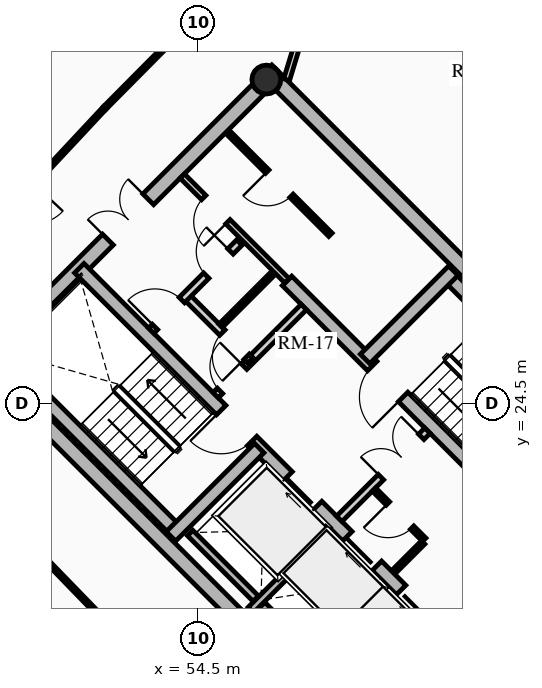
"""IFC4 building model, lengths in metres.
Left out: names, types, materials, properties, quantities, classifications, styles, units other than length and angle.
Written with IfcOpenShell. Run it as: python <this file> out.ifc"""

import sys

from ifc_helpers import new_model, si_unit, direction, frame, frame_2d, origin, origin_2d, place, context, subcontext, project, spatial, rectangle, hollow_circle, extrude, source, transform, mapped, element, fill, save


model = new_model("IFC4")
c1 = context("Model", 3, precision=1e-05, world=origin(), true_north=direction((0.0, 1.0)))
c2 = subcontext(c1, "Body", "Model", "MODEL_VIEW")
j1 = project(units=[si_unit("LENGTHUNIT", "METRE"), si_unit("PLANEANGLEUNIT", "RADIAN")], contexts=[c1])
p1 = place(None, origin())
s1 = spatial("IfcSite", under=j1, at=p1, CompositionType="ELEMENT")
p2 = place(p1, origin())
s2 = spatial("IfcBuilding", under=s1, at=p2, CompositionType="ELEMENT")
p3 = place(p2, frame((0.0, 0.0, 189.43)))
s3 = spatial("IfcBuildingStorey", under=s2, at=p3, CompositionType="ELEMENT", Elevation=189.43)
for number, where, z_axis, x_axis in (
    (1, (58.702, 15.732, 0.0), (0.0, 0.0, 1.0), (-0.707, 0.707, 0.0)),
    (2, (66.268, 23.298, 0.0), (0.0, 0.0, 1.0), (-0.707, 0.707, 0.0)),
):
    element("IfcWall", number, at=place(p3, frame(where, z_axis=z_axis, x_axis=x_axis)), inside=s3, PredefinedType="SHEAR", context=c2, shape_type="SweptSolid", body=[
        extrude(rectangle(XDim=14.1, YDim=0.4, at=frame_2d((7.05, 0.0))), origin(), (0.0, 0.0, 1.0), 2.91),
    ])
p4 = place(p3, frame((58.561, 15.873, 0.0), z_axis=(0.0, 0.0, 1.0), x_axis=(0.707106781187, 0.707106781187, 0.0)))
e3 = element("IfcWall", 3, at=p4, inside=s3, PredefinedType="SHEAR", context=c2, shape_type="SweptSolid", body=[
    extrude(rectangle(XDim=10.7, YDim=0.4, at=frame_2d((5.35, 0.0))), origin(), (0.0, 0.0, 1.0), 2.91),
])
m1 = source(origin(), c2, "Body", "SweptSolid", [
    extrude(rectangle(XDim=1.5, YDim=2.02, at=frame_2d((0.75, 1.01))), frame((0.0, 0.21, 0.0), z_axis=(0.0, -1.0, 0.0), x_axis=(1.0, 0.0, 0.0)), (0.0, 0.0, 1.0), 0.42),
])
p5 = place(p4, frame((5.45, 0.0, 0.0)))
e4 = element("IfcOpeningElement", 4, at=p5, cuts=e3, PredefinedType="OPENING", context=c2, shape_type="MappedRepresentation", body=[
    mapped(m1, transform((0.0, 0.0, 0.0), x_axis=(1.0, 0.0, 0.0), y_axis=(0.0, 1.0, 0.0), z_axis=(0.0, 0.0, 1.0), scale=1.0)),
])
p6 = place(p3, frame((48.873, 25.561, 0.0), z_axis=(0.0, 0.0, 1.0), x_axis=(0.707106781187, 0.707106781187, 0.0)))
e5 = element("IfcWall", 5, at=p6, inside=s3, PredefinedType="SHEAR", context=c2, shape_type="SweptSolid", body=[
    extrude(rectangle(XDim=10.7, YDim=0.4, at=frame_2d((5.35, 0.0))), origin(), (0.0, 0.0, 1.0), 2.91),
])
p7 = place(p6, frame((4.6, 0.0, 0.0)))
e6 = element("IfcOpeningElement", 6, at=p7, cuts=e5, PredefinedType="OPENING", context=c2, shape_type="MappedRepresentation", body=[
    mapped(m1, transform((0.0, 0.0, 0.0), x_axis=(1.0, 0.0, 0.0), y_axis=(0.0, 1.0, 0.0), z_axis=(0.0, 0.0, 1.0), scale=1.0)),
])
p8 = place(p3, frame((61.06, 18.373, 0.0), z_axis=(0.0, 0.0, 1.0), x_axis=(-0.707106781187, 0.707106781187, 0.0)))
e7 = element("IfcWall", 7, at=p8, inside=s3, PredefinedType="SHEAR", context=c2, shape_type="SweptSolid", body=[
    extrude(rectangle(XDim=13.7, YDim=0.35, at=frame_2d((6.85, 0.0))), origin(), (0.0, 0.0, 1.0), 2.91),
])
m2 = source(origin(), c2, "Body", "SweptSolid", [
    extrude(rectangle(XDim=1.1, YDim=2.015, at=frame_2d((0.55, 1.007))), frame((0.0, 0.185, 0.0), z_axis=(0.0, -1.0, 0.0), x_axis=(1.0, 0.0, 0.0)), (0.0, 0.0, 1.0), 0.37),
])
p9 = place(p8, frame((4.85, 0.0, 0.0)))
e8 = element("IfcOpeningElement", 8, at=p9, cuts=e7, PredefinedType="OPENING", context=c2, shape_type="MappedRepresentation", body=[
    mapped(m2, transform((0.0, 0.0, 0.0), x_axis=(1.0, 0.0, 0.0), y_axis=(0.0, 1.0, 0.0), z_axis=(0.0, 0.0, 1.0), scale=1.0)),
])
p10 = place(p8, frame((0.625, 0.0, 0.0)))
e9 = element("IfcOpeningElement", 9, at=p10, cuts=e7, PredefinedType="OPENING", context=c2, shape_type="MappedRepresentation", body=[
    mapped(m2, transform((0.0, 0.0, 0.0), x_axis=(1.0, 0.0, 0.0), y_axis=(0.0, 1.0, 0.0), z_axis=(0.0, 0.0, 1.0), scale=1.0)),
])
p11 = place(p8, frame((2.625, 0.0, 0.0)))
e10 = element("IfcOpeningElement", 10, at=p11, cuts=e7, PredefinedType="OPENING", context=c2, shape_type="MappedRepresentation", body=[
    mapped(m2, transform((0.0, 0.0, 0.0), x_axis=(1.0, 0.0, 0.0), y_axis=(0.0, 1.0, 0.0), z_axis=(0.0, 0.0, 1.0), scale=1.0)),
])
m3 = source(origin(), c2, "Body", "SweptSolid", [
    extrude(rectangle(XDim=1.15, YDim=2.02, at=frame_2d((0.575, 1.01))), frame((0.0, 0.185, 0.0), z_axis=(0.0, -1.0, 0.0), x_axis=(1.0, 0.0, 0.0)), (0.0, 0.0, 1.0), 0.37),
])
p12 = place(p8, frame((7.27, 0.0, 0.0)))
e11 = element("IfcOpeningElement", 11, at=p12, cuts=e7, PredefinedType="OPENING", context=c2, shape_type="MappedRepresentation", body=[
    mapped(m3, transform((0.0, 0.0, 0.0), x_axis=(1.0, 0.0, 0.0), y_axis=(0.0, 1.0, 0.0), z_axis=(0.0, 0.0, 1.0), scale=1.0)),
])
p13 = place(p3, frame((63.627, 20.94, 0.0), z_axis=(0.0, 0.0, 1.0), x_axis=(-0.707119496762, 0.707094065383, 0.0)))
e12 = element("IfcWall", 12, at=p13, inside=s3, PredefinedType="SHEAR", context=c2, shape_type="SweptSolid", body=[
    extrude(rectangle(XDim=9.6, YDim=0.35, at=frame_2d((4.8, 0.0))), origin(), (0.0, 0.0, 1.0), 2.91),
])
p14 = place(p13, frame((5.28, 0.0, 0.0)))
e13 = element("IfcOpeningElement", 13, at=p14, cuts=e12, PredefinedType="OPENING", context=c2, shape_type="MappedRepresentation", body=[
    mapped(m3, transform((0.0, 0.0, 0.0), x_axis=(1.0, 0.0, 0.0), y_axis=(0.0, 1.0, 0.0), z_axis=(0.0, 0.0, 1.0), scale=1.0)),
])
p15 = place(p3, frame((53.922, 21.141, 0.0), z_axis=(0.0, 0.0, 1.0), x_axis=(-0.707106781187, 0.707106781187, 0.0)))
e14 = element("IfcWall", 14, at=p15, inside=s3, PredefinedType="SHEAR", context=c2, shape_type="SweptSolid", body=[
    extrude(rectangle(XDim=6.695, YDim=0.35, at=frame_2d((3.348, 0.0))), origin(), (0.0, 0.0, 1.0), 2.91),
])
p16 = place(p3, frame((53.784, 21.003, 0.0), z_axis=(0.0, 0.0, 1.0), x_axis=(0.707106781187, 0.707106781187, 0.0)))
e15 = element("IfcWall", 15, at=p16, inside=s3, PredefinedType="SHEAR", context=c2, shape_type="SweptSolid", body=[
    extrude(rectangle(XDim=3.285, YDim=0.35, at=frame_2d((1.643, 0.0))), origin(), (0.0, 0.0, 1.0), 2.91),
])
p17 = place(p3, frame((65.812, 23.125, 0.0), z_axis=(0.0, 0.0, 1.0), x_axis=(-0.707106781187, 0.707106781187, 0.0)))
e16 = element("IfcWall", 16, at=p17, inside=s3, PredefinedType="SHEAR", context=c2, shape_type="SweptSolid", body=[
    extrude(rectangle(XDim=6.695, YDim=0.35, at=frame_2d((3.348, 0.0))), origin(), (0.0, 0.0, 1.0), 2.91),
])
p18 = place(p3, frame((58.893, 25.674, 0.0), z_axis=(0.0, 0.0, 1.0), x_axis=(0.707106781187, 0.707106781187, 0.0)))
e17 = element("IfcWall", 17, at=p18, inside=s3, PredefinedType="SHEAR", context=c2, shape_type="SweptSolid", body=[
    extrude(rectangle(XDim=3.285, YDim=0.35, at=frame_2d((1.643, 0.0))), origin(), (0.0, 0.0, 1.0), 2.91),
])
p19 = place(p3, frame((56.294, 33.024, 0.0), z_axis=(0.0, 0.0, 1.0), x_axis=(0.707106781187, 0.707106781187, 0.0)))
e18 = element("IfcColumn", 18, at=p19, inside=s3, PredefinedType="COLUMN", context=c2, shape_type="SweptSolid", body=[
    extrude(hollow_circle(Radius=0.38, WallThickness=0.032, at=origin_2d()), origin(), (0.0, 0.0, 1.0), 2.91),
])
p20 = place(p3, frame((55.888, 19.069, 0.0), z_axis=(0.0, 0.0, 1.0), x_axis=(0.707106781187, 0.707106781187, 0.0)))
e19 = element("IfcWall", 19, at=p20, inside=s3, PredefinedType="SHEAR", context=c2, shape_type="SweptSolid", body=[
    extrude(rectangle(XDim=2.97, YDim=0.2, at=frame_2d((1.485, 0.0))), origin(), (0.0, 0.0, 1.0), 2.91),
])
p21 = place(p3, frame((56.015, 19.366, 0.0), z_axis=(0.0, 0.0, 1.0), x_axis=(-0.707106781187, 0.707106781187, 0.0)))
e20 = element("IfcWall", 20, at=p21, inside=s3, PredefinedType="SHEAR", context=c2, shape_type="SweptSolid", body=[
    extrude(rectangle(XDim=2.44, YDim=0.2, at=frame_2d((1.22, 0.0))), origin(), (0.0, 0.0, 1.0), 2.91),
])
p22 = place(p3, frame((57.284, 17.673, 0.0), z_axis=(0.0, 0.0, 1.0), x_axis=(0.707147878904, 0.70706568108, 0.0)))
e21 = element("IfcWall", 21, at=p22, inside=s3, PredefinedType="SHEAR", context=c2, shape_type="SweptSolid", body=[
    extrude(rectangle(XDim=2.97, YDim=0.2, at=frame_2d((1.485, 0.0))), origin(), (0.0, 0.0, 1.0), 2.91),
])
p23 = place(p3, frame((57.412, 17.97, 0.0), z_axis=(0.0, 0.0, 1.0), x_axis=(-0.707106781187, 0.707106781187, 0.0)))
e22 = element("IfcWall", 22, at=p23, inside=s3, PredefinedType="SHEAR", context=c2, shape_type="SweptSolid", body=[
    extrude(rectangle(XDim=1.735, YDim=0.2, at=frame_2d((0.867, 0.0))), origin(), (0.0, 0.0, 1.0), 2.91),
])
p24 = place(p3, frame((58.214, 21.467, 0.0), z_axis=(0.0, 0.0, 1.0), x_axis=(0.707106781187, 0.707106781187, 0.0)))
e23 = element("IfcWall", 23, at=p24, inside=s3, PredefinedType="PARTITIONING", context=c2, shape_type="SweptSolid", body=[
    extrude(rectangle(XDim=3.28, YDim=0.2, at=frame_2d((1.64, 0.0))), origin(), (0.0, 0.0, 1.0), 2.555),
])
m4 = source(origin(), c2, "Body", "SweptSolid", [
    extrude(rectangle(XDim=1.5, YDim=2.02, at=frame_2d((0.75, 1.01))), frame((0.0, 0.11, 0.0), z_axis=(0.0, -1.0, 0.0), x_axis=(1.0, 0.0, 0.0)), (0.0, 0.0, 1.0), 0.22),
])
p25 = place(p24, frame((1.55, 0.0, 0.0)))
e24 = element("IfcOpeningElement", 24, at=p25, cuts=e23, PredefinedType="OPENING", context=c2, shape_type="MappedRepresentation", body=[
    mapped(m4, transform((0.0, 0.0, 0.0), x_axis=(1.0, 0.0, 0.0), y_axis=(0.0, 1.0, 0.0), z_axis=(0.0, 0.0, 1.0), scale=1.0)),
])
p26 = place(p3, frame((54.961, 24.719, 0.0), z_axis=(0.0, 0.0, 1.0), x_axis=(0.707106781187, 0.707106781187, 0.0)))
e25 = element("IfcWall", 25, at=p26, inside=s3, PredefinedType="PARTITIONING", context=c2, shape_type="SweptSolid", body=[
    extrude(rectangle(XDim=3.28, YDim=0.2, at=frame_2d((1.64, 0.0))), origin(), (0.0, 0.0, 1.0), 2.555),
])
m5 = source(origin(), c2, "Body", "SweptSolid", [
    extrude(rectangle(XDim=0.9, YDim=2.005, at=frame_2d((0.45, 1.002))), frame((0.0, 0.11, 0.0), z_axis=(0.0, -1.0, 0.0), x_axis=(1.0, 0.0, 0.0)), (0.0, 0.0, 1.0), 0.22),
])
p27 = place(p26, frame((0.16, 0.0, 0.0)))
e26 = element("IfcOpeningElement", 26, at=p27, cuts=e25, PredefinedType="OPENING", context=c2, shape_type="MappedRepresentation", body=[
    mapped(m5, transform((0.0, 0.0, 0.0), x_axis=(1.0, 0.0, 0.0), y_axis=(0.0, 1.0, 0.0), z_axis=(0.0, 0.0, 1.0), scale=1.0)),
])
p28 = place(p3, frame((55.874, 25.631, 0.0), z_axis=(0.0, 0.0, 1.0), x_axis=(-0.707157639372, 0.707055919343, 0.0)))
e27 = element("IfcWall", 27, at=p28, inside=s3, PredefinedType="PARTITIONING", context=c2, shape_type="SweptSolid", body=[
    extrude(rectangle(XDim=2.4, YDim=0.2, at=frame_2d((1.2, 0.0))), origin(), (0.0, 0.0, 1.0), 2.555),
])
p29 = place(p28, frame((0.14, 0.0, 0.0)))
e28 = element("IfcOpeningElement", 28, at=p29, cuts=e27, PredefinedType="OPENING", context=c2, shape_type="MappedRepresentation", body=[
    mapped(m5, transform((0.0, 0.0, 0.0), x_axis=(1.0, 0.0, 0.0), y_axis=(0.0, 1.0, 0.0), z_axis=(0.0, 0.0, 1.0), scale=1.0)),
])
p30 = place(p3, frame((53.264, 26.416, 0.0), z_axis=(0.0, 0.0, 1.0), x_axis=(0.707106781187, 0.707106781187, 0.0)))
e29 = element("IfcWall", 29, at=p30, inside=s3, PredefinedType="PARTITIONING", context=c2, shape_type="SweptSolid", body=[
    extrude(rectangle(XDim=3.28, YDim=0.2, at=frame_2d((1.64, 0.0))), origin(), (0.0, 0.0, 1.0), 2.555),
])
m6 = source(origin(), c2, "Body", "SweptSolid", [
    extrude(rectangle(XDim=1.0, YDim=2.015, at=frame_2d((0.5, 1.007))), frame((0.0, 0.11, 0.0), z_axis=(0.0, -1.0, 0.0), x_axis=(1.0, 0.0, 0.0)), (0.0, 0.0, 1.0), 0.22),
])
p31 = place(p30, frame((0.14, 0.0, 0.0)))
e30 = element("IfcOpeningElement", 30, at=p31, cuts=e29, PredefinedType="OPENING", context=c2, shape_type="MappedRepresentation", body=[
    mapped(m6, transform((0.0, 0.0, 0.0), x_axis=(1.0, 0.0, 0.0), y_axis=(0.0, 1.0, 0.0), z_axis=(0.0, 0.0, 1.0), scale=1.0)),
])
p32 = place(p30, frame((2.05, 0.0, 0.0)))
e31 = element("IfcOpeningElement", 31, at=p32, cuts=e29, PredefinedType="OPENING", context=c2, shape_type="MappedRepresentation", body=[
    mapped(m5, transform((0.0, 0.0, 0.0), x_axis=(1.0, 0.0, 0.0), y_axis=(0.0, 1.0, 0.0), z_axis=(0.0, 0.0, 1.0), scale=1.0)),
])
p33 = place(p3, frame((60.448, 20.915, 0.0), z_axis=(0.0, 0.0, 1.0), x_axis=(-0.707106781187, 0.707106781187, 0.0)))
e32 = element("IfcWall", 32, at=p33, inside=s3, PredefinedType="PARTITIONING", context=c2, shape_type="SweptSolid", body=[
    extrude(rectangle(XDim=1.87, YDim=0.125, at=frame_2d((0.935, 0.0))), origin(), (0.0, 0.0, 1.0), 2.555),
])
m7 = source(origin(), c2, "Body", "SweptSolid", [
    extrude(rectangle(XDim=0.9, YDim=2.005, at=frame_2d((0.45, 1.002))), frame((0.0, 0.073, 0.0), z_axis=(0.0, -1.0, 0.0), x_axis=(1.0, 0.0, 0.0)), (0.0, 0.0, 1.0), 0.145),
])
p34 = place(p33, frame((0.45, 0.0, 0.0)))
e33 = element("IfcOpeningElement", 33, at=p34, cuts=e32, PredefinedType="OPENING", context=c2, shape_type="MappedRepresentation", body=[
    mapped(m7, transform((0.0, 0.0, 0.0), x_axis=(1.0, 0.0, 0.0), y_axis=(0.0, 1.0, 0.0), z_axis=(0.0, 0.0, 1.0), scale=1.0)),
])
p35 = place(p3, frame((59.643, 20.066, 0.0), z_axis=(0.0, 0.0, 1.0), x_axis=(0.707106781187, 0.707106781187, 0.0)))
e34 = element("IfcWall", 34, at=p35, inside=s3, PredefinedType="PARTITIONING", context=c2, shape_type="SweptSolid", body=[
    extrude(rectangle(XDim=1.1, YDim=0.125, at=frame_2d((0.55, 0.0))), origin(), (0.0, 0.0, 1.0), 2.555),
])
p36 = place(p3, frame((55.089, 26.543, 0.0), z_axis=(0.0, 0.0, 1.0), x_axis=(0.707106781187, 0.707106781187, 0.0)))
e35 = element("IfcWall", 35, at=p36, inside=s3, PredefinedType="PARTITIONING", context=c2, shape_type="SweptSolid", body=[
    extrude(rectangle(XDim=1.88, YDim=0.125, at=frame_2d((0.94, 0.0))), origin(), (0.0, 0.0, 1.0), 2.555),
])
p37 = place(p3, frame((56.839, 27.728, 0.0), z_axis=(0.0, 0.0, 1.0), x_axis=(-0.707106781187, 0.707106781187, 0.0)))
e36 = element("IfcWall", 36, at=p37, inside=s3, PredefinedType="PARTITIONING", context=c2, shape_type="SweptSolid", body=[
    extrude(rectangle(XDim=3.9, YDim=0.16, at=frame_2d((1.95, 0.0))), origin(), (0.0, 0.0, 1.0), 2.555),
])
m8 = source(origin(), c2, "Body", "SweptSolid", [
    extrude(rectangle(XDim=0.9, YDim=2.005, at=frame_2d((0.45, 1.002))), frame((0.0, 0.09, 0.0), z_axis=(0.0, -1.0, 0.0), x_axis=(1.0, 0.0, 0.0)), (0.0, 0.0, 1.0), 0.18),
])
p38 = place(p37, frame((2.2, 0.0, 0.0)))
e37 = element("IfcOpeningElement", 37, at=p38, cuts=e36, PredefinedType="OPENING", context=c2, shape_type="MappedRepresentation", body=[
    mapped(m8, transform((0.0, 0.0, 0.0), x_axis=(1.0, 0.0, 0.0), y_axis=(0.0, 1.0, 0.0), z_axis=(0.0, 0.0, 1.0), scale=1.0)),
])
p39 = place(p3, frame((57.981, 28.941, 0.0), z_axis=(0.0, 0.0, 1.0), x_axis=(-0.707074823725, 0.707138737204, 0.0)))
e38 = element("IfcWall", 38, at=p39, inside=s3, PredefinedType="PARTITIONING", context=c2, shape_type="SweptSolid", body=[
    extrude(rectangle(XDim=3.82, YDim=0.125, at=frame_2d((1.91, 0.0))), origin(), (0.0, 0.0, 1.0), 2.555),
])
p40 = place(p39, frame((1.45, 0.0, 0.0)))
e39 = element("IfcOpeningElement", 39, at=p40, cuts=e38, PredefinedType="OPENING", context=c2, shape_type="MappedRepresentation", body=[
    mapped(m7, transform((0.0, 0.0, 0.0), x_axis=(1.0, 0.0, 0.0), y_axis=(0.0, 1.0, 0.0), z_axis=(0.0, 0.0, 1.0), scale=1.0)),
])
p41 = place(p3, frame((54.427, 34.683, 0.0), z_axis=(0.0, 0.0, 1.0), x_axis=(-0.704178989986, -0.710022499687, 0.0)))
e40 = element("IfcWall", 40, at=p41, inside=s3, PredefinedType="MOVABLE", context=c2, shape_type="SweptSolid", body=[
    extrude(rectangle(XDim=3.384, YDim=0.1, at=frame_2d((1.692, 0.0))), origin(), (0.0, 0.0, 1.0), 2.125),
])
p42 = place(p3, frame((52.043, 32.28, 0.0), z_axis=(0.0, 0.0, 1.0), x_axis=(-0.682606081633, -0.730786519661, 0.0)))
e41 = element("IfcWall", 41, at=p42, inside=s3, PredefinedType="MOVABLE", context=c2, shape_type="SweptSolid", body=[
    extrude(rectangle(XDim=6.527, YDim=0.1, at=frame_2d((3.263, 0.0))), origin(), (0.0, 0.0, 1.0), 2.125),
])
m9 = source(origin(), c2, "Body", "SweptSolid", [
    extrude(rectangle(XDim=1.05, YDim=2.015, at=frame_2d((0.525, 1.007))), frame((0.0, 0.06, 0.0), z_axis=(0.0, -1.0, 0.0), x_axis=(1.0, 0.0, 0.0)), (0.0, 0.0, 1.0), 0.12),
])
p43 = place(p42, frame((2.738, 0.0, 0.0)))
e42 = element("IfcOpeningElement", 42, at=p43, cuts=e41, PredefinedType="OPENING", context=c2, shape_type="MappedRepresentation", body=[
    mapped(m9, transform((0.0, 0.0, 0.0), x_axis=(1.0, 0.0, 0.0), y_axis=(0.0, 1.0, 0.0), z_axis=(0.0, 0.0, 1.0), scale=1.0)),
])
p44 = place(p3, frame((47.706, 23.253, 0.0), z_axis=(0.0, 0.0, 1.0), x_axis=(0.696179266346, -0.717867974707, 0.0)))
e43 = element("IfcWall", 43, at=p44, inside=s3, PredefinedType="MOVABLE", context=c2, shape_type="SweptSolid", body=[
    extrude(rectangle(XDim=6.045, YDim=0.1, at=frame_2d((3.022, 0.0))), origin(), (0.0, 0.0, 1.0), 2.555),
])
p45 = place(p3, frame((56.828, 33.021, 0.0), z_axis=(0.0, 0.0, 1.0), x_axis=(0.292139093972, 0.956375841274, 0.0)))
e44 = element("IfcWall", 44, at=p45, inside=s3, PredefinedType="PARTITIONING", context=c2, shape_type="SweptSolid", body=[
    extrude(rectangle(XDim=2.186, YDim=0.16, at=frame_2d((1.093, 0.0))), origin(), (0.0, 0.0, 1.0), 2.125),
])
m10 = source(origin(), c2, "Body", "SweptSolid", [
    extrude(rectangle(XDim=1.05, YDim=2.015, at=frame_2d((0.525, 1.007))), frame((0.0, 0.09, 0.0), z_axis=(0.0, -1.0, 0.0), x_axis=(1.0, 0.0, 0.0)), (0.0, 0.0, 1.0), 0.18),
])
p46 = place(p45, frame((0.936, 0.0, 0.0)))
e45 = element("IfcOpeningElement", 45, at=p46, cuts=e44, PredefinedType="OPENING", context=c2, shape_type="MappedRepresentation", body=[
    mapped(m10, transform((0.0, 0.0, 0.0), x_axis=(1.0, 0.0, 0.0), y_axis=(0.0, 1.0, 0.0), z_axis=(0.0, 0.0, 1.0), scale=1.0)),
])
m11 = source(origin(), c2, "Body", "SweptSolid", [
    extrude(rectangle(XDim=1.1, YDim=2.015, at=frame_2d((0.55, 1.007))), frame((0.0, 0.025, 0.0), z_axis=(0.0, -1.0, 0.0), x_axis=(1.0, 0.0, 0.0)), (0.0, 0.0, 1.0), 0.05),
])
p47 = place(p9, origin())
e46 = element("IfcDoor", 46, at=p47, inside=s3, OperationType="SLIDING_TO_RIGHT", PredefinedType="DOOR", context=c2, shape_type="MappedRepresentation", body=[
    mapped(m11, transform((0.0, 0.0, 0.0), x_axis=(1.0, 0.0, 0.0), y_axis=(0.0, 1.0, 0.0), z_axis=(0.0, 0.0, 1.0), scale=1.0)),
])
fill(e8, e46)
p48 = place(p10, origin())
e47 = element("IfcDoor", 47, at=p48, inside=s3, OperationType="SLIDING_TO_LEFT", PredefinedType="DOOR", context=c2, shape_type="MappedRepresentation", body=[
    mapped(m11, transform((0.0, 0.0, 0.0), x_axis=(1.0, 0.0, 0.0), y_axis=(0.0, 1.0, 0.0), z_axis=(0.0, 0.0, 1.0), scale=1.0)),
])
fill(e9, e47)
p49 = place(p11, origin())
e48 = element("IfcDoor", 48, at=p49, inside=s3, OperationType="SLIDING_TO_RIGHT", PredefinedType="DOOR", context=c2, shape_type="MappedRepresentation", body=[
    mapped(m11, transform((0.0, 0.0, 0.0), x_axis=(1.0, 0.0, 0.0), y_axis=(0.0, 1.0, 0.0), z_axis=(0.0, 0.0, 1.0), scale=1.0)),
])
fill(e10, e48)
m12 = source(origin(), c2, "Body", "SweptSolid", [
    extrude(rectangle(XDim=1.15, YDim=2.02, at=frame_2d((0.575, 1.01))), frame((0.0, 0.025, 0.0), z_axis=(0.0, -1.0, 0.0), x_axis=(1.0, 0.0, 0.0)), (0.0, 0.0, 1.0), 0.05),
])
p50 = place(p12, origin())
e49 = element("IfcDoor", 49, at=p50, inside=s3, OperationType="SINGLE_SWING_RIGHT", PredefinedType="DOOR", context=c2, shape_type="MappedRepresentation", body=[
    mapped(m12, transform((0.0, 0.0, 0.0), x_axis=(1.0, 0.0, 0.0), y_axis=(0.0, 1.0, 0.0), z_axis=(0.0, 0.0, 1.0), scale=1.0)),
])
fill(e11, e49)
p51 = place(p14, origin())
e50 = element("IfcDoor", 50, at=p51, inside=s3, OperationType="SINGLE_SWING_LEFT", PredefinedType="DOOR", context=c2, shape_type="MappedRepresentation", body=[
    mapped(m12, transform((0.0, 0.0, 0.0), x_axis=(1.0, 0.0, 0.0), y_axis=(0.0, 1.0, 0.0), z_axis=(0.0, 0.0, 1.0), scale=1.0)),
])
fill(e13, e50)
m13 = source(origin(), c2, "Body", "SweptSolid", [
    extrude(rectangle(XDim=1.5, YDim=2.02, at=frame_2d((0.75, 1.01))), frame((0.0, 0.025, 0.0), z_axis=(0.0, -1.0, 0.0), x_axis=(1.0, 0.0, 0.0)), (0.0, 0.0, 1.0), 0.05),
])
p52 = place(p7, origin())
e51 = element("IfcDoor", 51, at=p52, inside=s3, OperationType="DOUBLE_DOOR_SINGLE_SWING", PredefinedType="DOOR", context=c2, shape_type="MappedRepresentation", body=[
    mapped(m13, transform((0.0, 0.0, 0.0), x_axis=(1.0, 0.0, 0.0), y_axis=(0.0, 1.0, 0.0), z_axis=(0.0, 0.0, 1.0), scale=1.0)),
])
fill(e6, e51)
p53 = place(p25, origin())
e52 = element("IfcDoor", 52, at=p53, inside=s3, OperationType="DOUBLE_DOOR_SINGLE_SWING", PredefinedType="DOOR", context=c2, shape_type="MappedRepresentation", body=[
    mapped(m13, transform((0.0, 0.0, 0.0), x_axis=(1.0, 0.0, 0.0), y_axis=(0.0, 1.0, 0.0), z_axis=(0.0, 0.0, 1.0), scale=1.0)),
])
fill(e24, e52)
m14 = source(origin(), c2, "Body", "SweptSolid", [
    extrude(rectangle(XDim=0.9, YDim=2.005, at=frame_2d((0.45, 1.002))), frame((0.0, 0.025, 0.0), z_axis=(0.0, -1.0, 0.0), x_axis=(1.0, 0.0, 0.0)), (0.0, 0.0, 1.0), 0.05),
])
p54 = place(p27, origin())
e53 = element("IfcDoor", 53, at=p54, inside=s3, OperationType="SINGLE_SWING_RIGHT", PredefinedType="DOOR", context=c2, shape_type="MappedRepresentation", body=[
    mapped(m14, transform((0.0, 0.0, 0.0), x_axis=(1.0, 0.0, 0.0), y_axis=(0.0, 1.0, 0.0), z_axis=(0.0, 0.0, 1.0), scale=1.0)),
])
fill(e26, e53)
m15 = source(origin(), c2, "Body", "SweptSolid", [
    extrude(rectangle(XDim=1.0, YDim=2.015, at=frame_2d((0.5, 1.007))), frame((0.0, 0.025, 0.0), z_axis=(0.0, -1.0, 0.0), x_axis=(1.0, 0.0, 0.0)), (0.0, 0.0, 1.0), 0.05),
])
p55 = place(p31, origin())
e54 = element("IfcDoor", 54, at=p55, inside=s3, OperationType="SINGLE_SWING_LEFT", PredefinedType="DOOR", context=c2, shape_type="MappedRepresentation", body=[
    mapped(m15, transform((0.0, 0.0, 0.0), x_axis=(1.0, 0.0, 0.0), y_axis=(0.0, 1.0, 0.0), z_axis=(0.0, 0.0, 1.0), scale=1.0)),
])
fill(e30, e54)
p56 = place(p34, origin())
e55 = element("IfcDoor", 55, at=p56, inside=s3, OperationType="SINGLE_SWING_RIGHT", PredefinedType="DOOR", context=c2, shape_type="MappedRepresentation", body=[
    mapped(m14, transform((0.0, 0.0, 0.0), x_axis=(1.0, 0.0, 0.0), y_axis=(0.0, 1.0, 0.0), z_axis=(0.0, 0.0, 1.0), scale=1.0)),
])
fill(e33, e55)
p57 = place(p29, origin())
e56 = element("IfcDoor", 56, at=p57, inside=s3, OperationType="SINGLE_SWING_LEFT", PredefinedType="DOOR", context=c2, shape_type="MappedRepresentation", body=[
    mapped(m14, transform((0.0, 0.0, 0.0), x_axis=(1.0, 0.0, 0.0), y_axis=(0.0, 1.0, 0.0), z_axis=(0.0, 0.0, 1.0), scale=1.0)),
])
fill(e28, e56)
p58 = place(p32, origin())
e57 = element("IfcDoor", 57, at=p58, inside=s3, OperationType="SINGLE_SWING_RIGHT", PredefinedType="DOOR", context=c2, shape_type="MappedRepresentation", body=[
    mapped(m14, transform((0.0, 0.0, 0.0), x_axis=(1.0, 0.0, 0.0), y_axis=(0.0, 1.0, 0.0), z_axis=(0.0, 0.0, 1.0), scale=1.0)),
])
fill(e31, e57)
p59 = place(p38, origin())
e58 = element("IfcDoor", 58, at=p59, inside=s3, OperationType="SINGLE_SWING_LEFT", PredefinedType="DOOR", context=c2, shape_type="MappedRepresentation", body=[
    mapped(m14, transform((0.0, 0.0, 0.0), x_axis=(1.0, 0.0, 0.0), y_axis=(0.0, 1.0, 0.0), z_axis=(0.0, 0.0, 1.0), scale=1.0)),
])
fill(e37, e58)
p60 = place(p40, origin())
e59 = element("IfcDoor", 59, at=p60, inside=s3, OperationType="SINGLE_SWING_RIGHT", PredefinedType="DOOR", context=c2, shape_type="MappedRepresentation", body=[
    mapped(m14, transform((0.0, 0.0, 0.0), x_axis=(1.0, 0.0, 0.0), y_axis=(0.0, 1.0, 0.0), z_axis=(0.0, 0.0, 1.0), scale=1.0)),
])
fill(e39, e59)
save(model, sys.argv[1])
